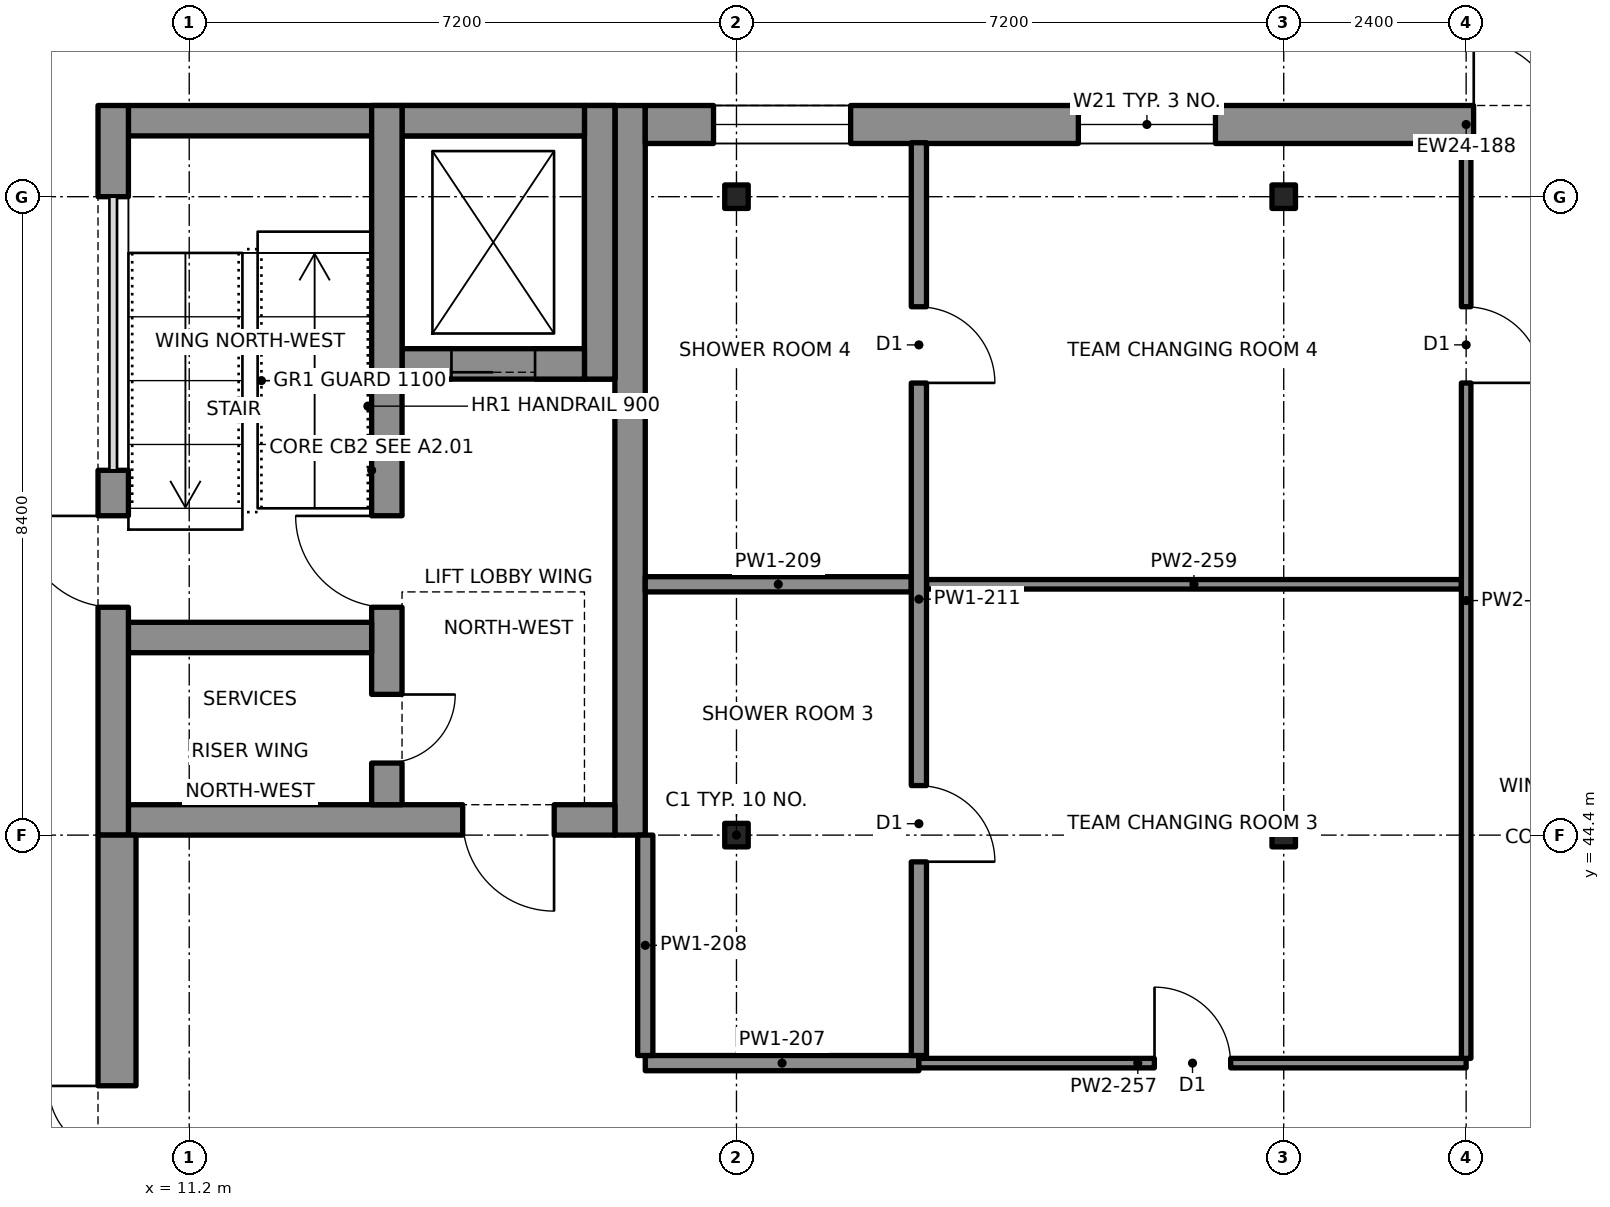
"""IFC4 building model, lengths in metres.
Left out: names, types, materials, properties, quantities, classifications, styles, units other than length and angle.
Written with IfcOpenShell. Run it as: python <this file> out.ifc"""

import sys

from ifc_helpers import new_model, si_unit, direction, frame, frame_2d, origin, origin_2d, place, context, subcontext, project, spatial, rectangle, i_section, extrude, element, fill, save


model = new_model("IFC4")
c1 = context("Model", 3, precision=1e-05, world=origin(), true_north=direction((0.0, 1.0)))
c2 = subcontext(c1, "Body", "Model", "MODEL_VIEW")
j1 = project(units=[si_unit("LENGTHUNIT", "METRE"), si_unit("PLANEANGLEUNIT", "RADIAN")], contexts=[c1])
p1 = place(None, origin())
s1 = spatial("IfcSite", under=j1, at=p1, CompositionType="ELEMENT")
p2 = place(p1, origin())
s2 = spatial("IfcBuilding", under=s1, at=p2, CompositionType="ELEMENT")
p3 = place(p2, origin())
s3 = spatial("IfcBuildingStorey", under=s2, at=p3, CompositionType="ELEMENT", Elevation=0.0)
for number, where, z_axis, x_axis in (
    (1, (18.4, 44.4, -0.9), (0.0, 0.0, 1.0), (1.0, 0.0, 0.0)),
    (2, (18.4, 52.8, -0.9), (0.0, 0.0, 1.0), (1.0, 0.0, 0.0)),
    (3, (25.6, 44.4, -0.9), (0.0, 0.0, 1.0), (1.0, 0.0, 0.0)),
    (4, (25.6, 52.8, -0.9), (0.0, 0.0, 1.0), (1.0, 0.0, 0.0)),
):
    element("IfcColumn", number, at=place(p3, frame(where, z_axis=z_axis, x_axis=x_axis)), inside=s3, PredefinedType="COLUMN", context=c2, shape_type="SweptSolid", body=[
        extrude(i_section(OverallWidth=0.309, OverallDepth=0.323, WebThickness=0.014, FlangeThickness=0.023, at=origin_2d()), origin(), (0.0, 0.0, 1.0), 5.3),
    ])
p4 = place(p3, frame((17.2, 53.75, 0.0), z_axis=(0.0, 0.0, 1.0), x_axis=(1.0, 0.0, 0.0)))
e5 = element("IfcWall", 5, at=p4, inside=s3, PredefinedType="SOLIDWALL", context=c2, shape_type="SweptSolid", body=[
    extrude(rectangle(XDim=21.6, YDim=0.5, at=frame_2d((10.8, 0.0))), origin(), (0.0, 0.0, 1.0), 4.4),
])
p5 = place(p4, frame((0.9, 0.0, 0.9)))
e6 = element("IfcOpeningElement", 6, at=p5, cuts=e5, PredefinedType="OPENING", context=c2, shape_type="SweptSolid", body=[
    extrude(rectangle(XDim=1.8, YDim=2.0, at=frame_2d((0.9, 1.0))), frame((0.0, 0.26, 0.0), z_axis=(0.0, -1.0, 0.0), x_axis=(1.0, 0.0, 0.0)), (0.0, 0.0, 1.0), 0.52),
])
p6 = place(p4, frame((5.7, 0.0, 0.9)))
e7 = element("IfcOpeningElement", 7, at=p6, cuts=e5, PredefinedType="OPENING", context=c2, shape_type="SweptSolid", body=[
    extrude(rectangle(XDim=1.8, YDim=2.0, at=frame_2d((0.9, 1.0))), frame((0.0, 0.26, 0.0), z_axis=(0.0, -1.0, 0.0), x_axis=(1.0, 0.0, 0.0)), (0.0, 0.0, 1.0), 0.52),
])
p7 = place(p4, frame((17.7, 0.0, 0.9)))
e8 = element("IfcOpeningElement", 8, at=p7, cuts=e5, PredefinedType="OPENING", context=c2, shape_type="SweptSolid", body=[
    extrude(rectangle(XDim=1.8, YDim=2.0, at=frame_2d((0.9, 1.0))), frame((0.0, 0.26, 0.0), z_axis=(0.0, -1.0, 0.0), x_axis=(1.0, 0.0, 0.0)), (0.0, 0.0, 1.0), 0.52),
])
p8 = place(p4, frame((10.9, 0.0, 0.0)))
e9 = element("IfcOpeningElement", 9, at=p8, cuts=e5, PredefinedType="OPENING", context=c2, shape_type="SweptSolid", body=[
    extrude(rectangle(XDim=2.2, YDim=2.4, at=frame_2d((1.1, 1.2))), frame((0.0, 0.26, 0.0), z_axis=(0.0, -1.0, 0.0), x_axis=(1.0, 0.0, 0.0)), (0.0, 0.0, 1.0), 0.52),
])
p9 = place(p3, frame((10.25, 27.6, 0.0), z_axis=(0.0, 0.0, 1.0), x_axis=(0.0, 1.0, 0.0)))
e10 = element("IfcWall", 10, at=p9, inside=s3, PredefinedType="SOLIDWALL", context=c2, shape_type="SweptSolid", body=[
    extrude(rectangle(XDim=16.8, YDim=0.5, at=frame_2d((8.4, 0.0))), origin(), (0.0, 0.0, 1.0), 4.4),
])
p10 = place(p9, frame((3.3, 0.0, 0.0)))
e11 = element("IfcOpeningElement", 11, at=p10, cuts=e10, PredefinedType="OPENING", context=c2, shape_type="SweptSolid", body=[
    extrude(rectangle(XDim=1.8, YDim=2.4, at=frame_2d((0.9, 1.2))), frame((0.0, 0.26, 0.0), z_axis=(0.0, -1.0, 0.0), x_axis=(1.0, 0.0, 0.0)), (0.0, 0.0, 1.0), 0.52),
])
p11 = place(p9, frame((11.7, 0.0, 0.0)))
e12 = element("IfcOpeningElement", 12, at=p11, cuts=e10, PredefinedType="OPENING", context=c2, shape_type="SweptSolid", body=[
    extrude(rectangle(XDim=1.8, YDim=2.4, at=frame_2d((0.9, 1.2))), frame((0.0, 0.26, 0.0), z_axis=(0.0, -1.0, 0.0), x_axis=(1.0, 0.0, 0.0)), (0.0, 0.0, 1.0), 0.52),
])
p12 = place(p3, frame((10.2, 44.4, 0.0), z_axis=(0.0, 0.0, 1.0), x_axis=(0.0, 1.0, 0.0)))
e13 = element("IfcWall", 13, at=p12, inside=s3, PredefinedType="SHEAR", context=c2, shape_type="SweptSolid", body=[
    extrude(rectangle(XDim=4.8, YDim=0.4, at=frame_2d((2.4, 0.0))), origin(), (0.0, 0.0, 1.0), 4.4),
])
p13 = place(p12, frame((3.0, 0.0, 0.0)))
e14 = element("IfcOpeningElement", 14, at=p13, cuts=e13, PredefinedType="OPENING", context=c2, shape_type="SweptSolid", body=[
    extrude(rectangle(XDim=1.2, YDim=2.1, at=frame_2d((0.6, 1.05))), frame((0.0, 0.21, 0.0), z_axis=(0.0, -1.0, 0.0), x_axis=(1.0, 0.0, 0.0)), (0.0, 0.0, 1.0), 0.42),
])
p14 = place(p3, frame((10.2, 52.8, 0.0), z_axis=(0.0, 0.0, 1.0), x_axis=(0.0, 1.0, 0.0)))
e15 = element("IfcWall", 15, at=p14, inside=s3, PredefinedType="SHEAR", context=c2, shape_type="SweptSolid", body=[
    extrude(rectangle(XDim=1.2, YDim=0.4, at=frame_2d((0.6, 0.0))), origin(), (0.0, 0.0, 1.0), 4.4),
])
p15 = place(p3, frame((17.0, 44.4, 0.0), z_axis=(0.0, 0.0, 1.0), x_axis=(0.0, 1.0, 0.0)))
e16 = element("IfcWall", 16, at=p15, inside=s3, PredefinedType="SHEAR", context=c2, shape_type="SweptSolid", body=[
    extrude(rectangle(XDim=9.6, YDim=0.4, at=frame_2d((4.8, 0.0))), origin(), (0.0, 0.0, 1.0), 4.4),
])
p16 = place(p3, frame((10.4, 53.8, 0.0), z_axis=(0.0, 0.0, 1.0), x_axis=(1.0, 0.0, 0.0)))
e17 = element("IfcWall", 17, at=p16, inside=s3, PredefinedType="SHEAR", context=c2, shape_type="SweptSolid", body=[
    extrude(rectangle(XDim=6.4, YDim=0.4, at=frame_2d((3.2, 0.0))), origin(), (0.0, 0.0, 1.0), 4.4),
])
p17 = place(p3, frame((10.4, 44.6, 0.0), z_axis=(0.0, 0.0, 1.0), x_axis=(1.0, 0.0, 0.0)))
e18 = element("IfcWall", 18, at=p17, inside=s3, PredefinedType="SHEAR", context=c2, shape_type="SweptSolid", body=[
    extrude(rectangle(XDim=6.4, YDim=0.4, at=frame_2d((3.2, 0.0))), origin(), (0.0, 0.0, 1.0), 4.4),
])
p18 = place(p17, frame((4.4, 0.0, 0.0)))
e19 = element("IfcOpeningElement", 19, at=p18, cuts=e18, PredefinedType="OPENING", context=c2, shape_type="SweptSolid", body=[
    extrude(rectangle(XDim=1.2, YDim=2.1, at=frame_2d((0.6, 1.05))), frame((0.0, 0.21, 0.0), z_axis=(0.0, -1.0, 0.0), x_axis=(1.0, 0.0, 0.0)), (0.0, 0.0, 1.0), 0.42),
])
p19 = place(p3, frame((13.8, 44.8, 0.0), z_axis=(0.0, 0.0, 1.0), x_axis=(0.0, 1.0, 0.0)))
e20 = element("IfcWall", 20, at=p19, inside=s3, PredefinedType="SHEAR", context=c2, shape_type="SweptSolid", body=[
    extrude(rectangle(XDim=8.8, YDim=0.4, at=frame_2d((4.4, 0.0))), origin(), (0.0, 0.0, 1.0), 4.4),
])
p20 = place(p19, frame((2.6, 0.0, 0.0)))
e21 = element("IfcOpeningElement", 21, at=p20, cuts=e20, PredefinedType="OPENING", context=c2, shape_type="SweptSolid", body=[
    extrude(rectangle(XDim=1.2, YDim=2.1, at=frame_2d((0.6, 1.05))), frame((0.0, 0.21, 0.0), z_axis=(0.0, -1.0, 0.0), x_axis=(1.0, 0.0, 0.0)), (0.0, 0.0, 1.0), 0.42),
])
p21 = place(p19, frame((0.55, 0.0, 0.0)))
e22 = element("IfcOpeningElement", 22, at=p21, cuts=e20, PredefinedType="OPENING", context=c2, shape_type="SweptSolid", body=[
    extrude(rectangle(XDim=0.9, YDim=2.1, at=frame_2d((0.45, 1.05))), frame((0.0, 0.21, 0.0), z_axis=(0.0, -1.0, 0.0), x_axis=(1.0, 0.0, 0.0)), (0.0, 0.0, 1.0), 0.42),
])
p22 = place(p3, frame((10.4, 47.0, 0.0), z_axis=(0.0, 0.0, 1.0), x_axis=(1.0, 0.0, 0.0)))
e23 = element("IfcWall", 23, at=p22, inside=s3, PredefinedType="SHEAR", context=c2, shape_type="SweptSolid", body=[
    extrude(rectangle(XDim=3.2, YDim=0.4, at=frame_2d((1.6, 0.0))), origin(), (0.0, 0.0, 1.0), 4.4),
])
p23 = place(p3, frame((14.0, 50.6, 0.0), z_axis=(0.0, 0.0, 1.0), x_axis=(1.0, 0.0, 0.0)))
e24 = element("IfcWall", 24, at=p23, inside=s3, PredefinedType="SHEAR", context=c2, shape_type="SweptSolid", body=[
    extrude(rectangle(XDim=2.8, YDim=0.4, at=frame_2d((1.4, 0.0))), origin(), (0.0, 0.0, 1.0), 4.4),
])
p24 = place(p23, frame((0.65, 0.0, 0.0)))
e25 = element("IfcOpeningElement", 25, at=p24, cuts=e24, PredefinedType="OPENING", context=c2, shape_type="SweptSolid", body=[
    extrude(rectangle(XDim=1.1, YDim=2.1, at=frame_2d((0.55, 1.05))), frame((0.0, 0.21, 0.0), z_axis=(0.0, -1.0, 0.0), x_axis=(1.0, 0.0, 0.0)), (0.0, 0.0, 1.0), 0.42),
])
p25 = place(p3, frame((16.6, 50.8, 0.0), z_axis=(0.0, 0.0, 1.0), x_axis=(0.0, 1.0, 0.0)))
e26 = element("IfcWall", 26, at=p25, inside=s3, PredefinedType="SHEAR", context=c2, shape_type="SweptSolid", body=[
    extrude(rectangle(XDim=2.8, YDim=0.4, at=frame_2d((1.4, 0.0))), origin(), (0.0, 0.0, 1.0), 4.4),
])
for number, where, z_axis, x_axis in (
    (27, (13.8, 50.4, -1.5), (0.0, 0.0, 1.0), (0.0, 1.0, 0.0)),
    (28, (16.6, 50.4, -1.5), (0.0, 0.0, 1.0), (0.0, 1.0, 0.0)),
):
    element("IfcWall", number, at=place(p3, frame(where, z_axis=z_axis, x_axis=x_axis)), inside=s3, PredefinedType="SHEAR", context=c2, shape_type="SweptSolid", body=[
        extrude(rectangle(XDim=3.6, YDim=0.4, at=frame_2d((1.8, 0.0))), origin(), (0.0, 0.0, 1.0), 1.5),
    ])
for number, where, z_axis, x_axis in (
    (29, (14.0, 50.6, -1.5), (0.0, 0.0, 1.0), (1.0, 0.0, 0.0)),
    (30, (14.0, 53.8, -1.5), (0.0, 0.0, 1.0), (1.0, 0.0, 0.0)),
):
    element("IfcWall", number, at=place(p3, frame(where, z_axis=z_axis, x_axis=x_axis)), inside=s3, PredefinedType="SHEAR", context=c2, shape_type="SweptSolid", body=[
        extrude(rectangle(XDim=2.4, YDim=0.4, at=frame_2d((1.2, 0.0))), origin(), (0.0, 0.0, 1.0), 1.5),
    ])
p26 = place(p3, frame((17.2, 41.4, 0.0), z_axis=(0.0, 0.0, 1.0), x_axis=(1.0, 0.0, 0.0)))
e31 = element("IfcWall", 31, at=p26, inside=s3, PredefinedType="PARTITIONING", context=c2, shape_type="SweptSolid", body=[
    extrude(rectangle(XDim=3.6, YDim=0.2, at=frame_2d((1.8, 0.0))), origin(), (0.0, 0.0, 1.0), 3.65),
])
p27 = place(p3, frame((20.8, 41.4, 0.0), z_axis=(0.0, 0.0, 1.0), x_axis=(1.0, 0.0, 0.0)))
e32 = element("IfcWall", 32, at=p27, inside=s3, PredefinedType="PARTITIONING", context=c2, shape_type="SweptSolid", body=[
    extrude(rectangle(XDim=7.2, YDim=0.125, at=frame_2d((3.6, 0.0))), origin(), (0.0, 0.0, 1.0), 3.65),
])
p28 = place(p27, frame((3.1, 0.0, 0.0)))
e33 = element("IfcOpeningElement", 33, at=p28, cuts=e32, PredefinedType="OPENING", context=c2, shape_type="SweptSolid", body=[
    extrude(rectangle(XDim=1.0, YDim=2.1, at=frame_2d((0.5, 1.05))), frame((0.0, 0.073, 0.0), z_axis=(0.0, -1.0, 0.0), x_axis=(1.0, 0.0, 0.0)), (0.0, 0.0, 1.0), 0.145),
])
p29 = place(p3, frame((17.2, 47.7, 0.0), z_axis=(0.0, 0.0, 1.0), x_axis=(1.0, 0.0, 0.0)))
e34 = element("IfcWall", 34, at=p29, inside=s3, PredefinedType="PARTITIONING", context=c2, shape_type="SweptSolid", body=[
    extrude(rectangle(XDim=3.5, YDim=0.2, at=frame_2d((1.75, 0.0))), origin(), (0.0, 0.0, 1.0), 3.65),
])
p30 = place(p3, frame((20.9, 47.7, 0.0), z_axis=(0.0, 0.0, 1.0), x_axis=(1.0, 0.0, 0.0)))
e35 = element("IfcWall", 35, at=p30, inside=s3, PredefinedType="PARTITIONING", context=c2, shape_type="SweptSolid", body=[
    extrude(rectangle(XDim=7.038, YDim=0.125, at=frame_2d((3.519, 0.0))), origin(), (0.0, 0.0, 1.0), 3.65),
])
p31 = place(p3, frame((17.2, 41.5, 0.0), z_axis=(0.0, 0.0, 1.0), x_axis=(0.0, 1.0, 0.0)))
e36 = element("IfcWall", 36, at=p31, inside=s3, PredefinedType="PARTITIONING", context=c2, shape_type="SweptSolid", body=[
    extrude(rectangle(XDim=2.9, YDim=0.2, at=frame_2d((1.45, 0.0))), origin(), (0.0, 0.0, 1.0), 3.65),
])
p32 = place(p3, frame((20.8, 41.5, 0.0), z_axis=(0.0, 0.0, 1.0), x_axis=(0.0, 1.0, 0.0)))
e37 = element("IfcWall", 37, at=p32, inside=s3, PredefinedType="PARTITIONING", context=c2, shape_type="SweptSolid", body=[
    extrude(rectangle(XDim=12.01, YDim=0.2, at=frame_2d((6.005, 0.0))), origin(), (0.0, 0.0, 1.0), 3.65),
])
p33 = place(p32, frame((2.55, 0.0, 0.0)))
e38 = element("IfcOpeningElement", 38, at=p33, cuts=e37, PredefinedType="OPENING", context=c2, shape_type="SweptSolid", body=[
    extrude(rectangle(XDim=1.0, YDim=2.1, at=frame_2d((0.5, 1.05))), frame((0.0, 0.11, 0.0), z_axis=(0.0, -1.0, 0.0), x_axis=(1.0, 0.0, 0.0)), (0.0, 0.0, 1.0), 0.22),
])
p34 = place(p32, frame((8.85, 0.0, 0.0)))
e39 = element("IfcOpeningElement", 39, at=p34, cuts=e37, PredefinedType="OPENING", context=c2, shape_type="SweptSolid", body=[
    extrude(rectangle(XDim=1.0, YDim=2.1, at=frame_2d((0.5, 1.05))), frame((0.0, 0.11, 0.0), z_axis=(0.0, -1.0, 0.0), x_axis=(1.0, 0.0, 0.0)), (0.0, 0.0, 1.0), 0.22),
])
p35 = place(p3, frame((28.0, 41.462, 0.0), z_axis=(0.0, 0.0, 1.0), x_axis=(0.0, 1.0, 0.0)))
e40 = element("IfcWall", 40, at=p35, inside=s3, PredefinedType="PARTITIONING", context=c2, shape_type="SweptSolid", body=[
    extrude(rectangle(XDim=12.048, YDim=0.125, at=frame_2d((6.024, 0.0))), origin(), (0.0, 0.0, 1.0), 3.65),
])
p36 = place(p35, frame((8.888, 0.0, 0.0)))
e41 = element("IfcOpeningElement", 41, at=p36, cuts=e40, PredefinedType="OPENING", context=c2, shape_type="SweptSolid", body=[
    extrude(rectangle(XDim=1.0, YDim=2.1, at=frame_2d((0.5, 1.05))), frame((0.0, 0.073, 0.0), z_axis=(0.0, -1.0, 0.0), x_axis=(1.0, 0.0, 0.0)), (0.0, 0.0, 1.0), 0.145),
])
p37 = place(p5, origin())
e42 = element("IfcWindow", 42, at=p37, inside=s3, PartitioningType="SINGLE_PANEL", PredefinedType="WINDOW", context=c2, shape_type="SweptSolid", body=[
    extrude(rectangle(XDim=1.8, YDim=2.0, at=frame_2d((0.9, 1.0))), frame((0.0, 0.03, 0.0), z_axis=(0.0, -1.0, 0.0), x_axis=(1.0, 0.0, 0.0)), (0.0, 0.0, 1.0), 0.06),
])
fill(e6, e42)
p38 = place(p6, origin())
e43 = element("IfcWindow", 43, at=p38, inside=s3, PartitioningType="SINGLE_PANEL", PredefinedType="WINDOW", context=c2, shape_type="SweptSolid", body=[
    extrude(rectangle(XDim=1.8, YDim=2.0, at=frame_2d((0.9, 1.0))), frame((0.0, 0.03, 0.0), z_axis=(0.0, -1.0, 0.0), x_axis=(1.0, 0.0, 0.0)), (0.0, 0.0, 1.0), 0.06),
])
fill(e7, e43)
p39 = place(p8, origin())
e44 = element("IfcDoor", 44, at=p39, inside=s3, OperationType="DOUBLE_DOOR_SINGLE_SWING", PredefinedType="DOOR", context=c2, shape_type="SweptSolid", body=[
    extrude(rectangle(XDim=2.2, YDim=2.4, at=frame_2d((1.1, 1.2))), frame((0.0, 0.025, 0.0), z_axis=(0.0, -1.0, 0.0), x_axis=(1.0, 0.0, 0.0)), (0.0, 0.0, 1.0), 0.05),
])
fill(e9, e44)
p40 = place(p11, origin())
e45 = element("IfcDoor", 45, at=p40, inside=s3, OperationType="DOUBLE_DOOR_SINGLE_SWING", PredefinedType="DOOR", context=c2, shape_type="SweptSolid", body=[
    extrude(rectangle(XDim=1.8, YDim=2.4, at=frame_2d((0.9, 1.2))), frame((0.0, 0.025, 0.0), z_axis=(0.0, -1.0, 0.0), x_axis=(1.0, 0.0, 0.0)), (0.0, 0.0, 1.0), 0.05),
])
fill(e12, e45)
p41 = place(p13, origin())
e46 = element("IfcDoor", 46, at=p41, inside=s3, OperationType="SINGLE_SWING_RIGHT", PredefinedType="DOOR", context=c2, shape_type="SweptSolid", body=[
    extrude(rectangle(XDim=1.2, YDim=2.1, at=frame_2d((0.6, 1.05))), frame((0.0, 0.025, 0.0), z_axis=(0.0, -1.0, 0.0), x_axis=(1.0, 0.0, 0.0)), (0.0, 0.0, 1.0), 0.05),
])
fill(e14, e46)
p42 = place(p18, origin())
e47 = element("IfcDoor", 47, at=p42, inside=s3, OperationType="SINGLE_SWING_RIGHT", PredefinedType="DOOR", context=c2, shape_type="SweptSolid", body=[
    extrude(rectangle(XDim=1.2, YDim=2.1, at=frame_2d((0.6, 1.05))), frame((0.0, 0.025, 0.0), z_axis=(0.0, -1.0, 0.0), x_axis=(1.0, 0.0, 0.0)), (0.0, 0.0, 1.0), 0.05),
])
fill(e19, e47)
p43 = place(p20, origin())
e48 = element("IfcDoor", 48, at=p43, inside=s3, OperationType="SINGLE_SWING_RIGHT", PredefinedType="DOOR", context=c2, shape_type="SweptSolid", body=[
    extrude(rectangle(XDim=1.2, YDim=2.1, at=frame_2d((0.6, 1.05))), frame((0.0, 0.025, 0.0), z_axis=(0.0, -1.0, 0.0), x_axis=(1.0, 0.0, 0.0)), (0.0, 0.0, 1.0), 0.05),
])
fill(e21, e48)
p44 = place(p21, origin())
e49 = element("IfcDoor", 49, at=p44, inside=s3, OperationType="SINGLE_SWING_RIGHT", PredefinedType="DOOR", context=c2, shape_type="SweptSolid", body=[
    extrude(rectangle(XDim=0.9, YDim=2.1, at=frame_2d((0.45, 1.05))), frame((0.0, 0.025, 0.0), z_axis=(0.0, -1.0, 0.0), x_axis=(1.0, 0.0, 0.0)), (0.0, 0.0, 1.0), 0.05),
])
fill(e22, e49)
p45 = place(p24, origin())
e50 = element("IfcDoor", 50, at=p45, inside=s3, OperationType="SLIDING_TO_RIGHT", PredefinedType="DOOR", context=c2, shape_type="SweptSolid", body=[
    extrude(rectangle(XDim=1.1, YDim=2.1, at=frame_2d((0.55, 1.05))), frame((0.0, 0.025, 0.0), z_axis=(0.0, -1.0, 0.0), x_axis=(1.0, 0.0, 0.0)), (0.0, 0.0, 1.0), 0.05),
])
fill(e25, e50)
p46 = place(p28, origin())
e51 = element("IfcDoor", 51, at=p46, inside=s3, OperationType="SINGLE_SWING_LEFT", PredefinedType="DOOR", context=c2, shape_type="SweptSolid", body=[
    extrude(rectangle(XDim=1.0, YDim=2.1, at=frame_2d((0.5, 1.05))), frame((0.0, 0.025, 0.0), z_axis=(0.0, -1.0, 0.0), x_axis=(1.0, 0.0, 0.0)), (0.0, 0.0, 1.0), 0.05),
])
fill(e33, e51)
p47 = place(p33, origin())
e52 = element("IfcDoor", 52, at=p47, inside=s3, OperationType="SINGLE_SWING_LEFT", PredefinedType="DOOR", context=c2, shape_type="SweptSolid", body=[
    extrude(rectangle(XDim=1.0, YDim=2.1, at=frame_2d((0.5, 1.05))), frame((0.0, 0.025, 0.0), z_axis=(0.0, -1.0, 0.0), x_axis=(1.0, 0.0, 0.0)), (0.0, 0.0, 1.0), 0.05),
])
fill(e38, e52)
p48 = place(p36, origin())
e53 = element("IfcDoor", 53, at=p48, inside=s3, OperationType="SINGLE_SWING_LEFT", PredefinedType="DOOR", context=c2, shape_type="SweptSolid", body=[
    extrude(rectangle(XDim=1.0, YDim=2.1, at=frame_2d((0.5, 1.05))), frame((0.0, 0.025, 0.0), z_axis=(0.0, -1.0, 0.0), x_axis=(1.0, 0.0, 0.0)), (0.0, 0.0, 1.0), 0.05),
])
fill(e41, e53)
p49 = place(p34, origin())
e54 = element("IfcDoor", 54, at=p49, inside=s3, OperationType="SINGLE_SWING_LEFT", PredefinedType="DOOR", context=c2, shape_type="SweptSolid", body=[
    extrude(rectangle(XDim=1.0, YDim=2.1, at=frame_2d((0.5, 1.05))), frame((0.0, 0.025, 0.0), z_axis=(0.0, -1.0, 0.0), x_axis=(1.0, 0.0, 0.0)), (0.0, 0.0, 1.0), 0.05),
])
fill(e39, e54)
save(model, sys.argv[1])
